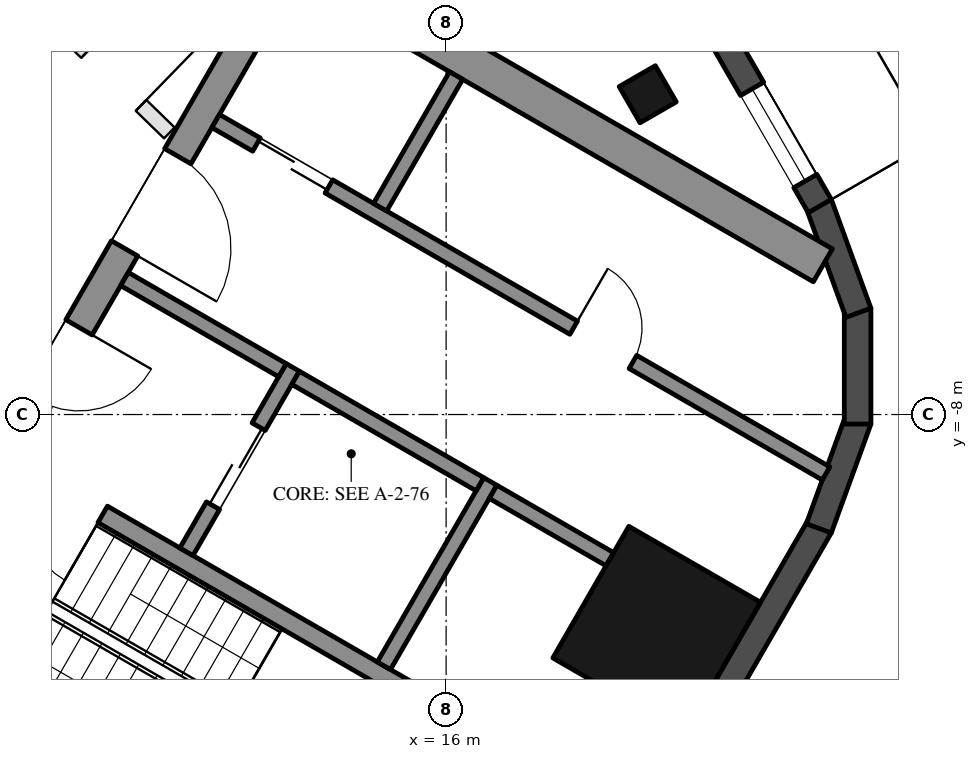
"""IFC4 building model, lengths in metres.
Left out: names, types, materials, properties, quantities, classifications, styles, units other than length and angle.
Written with IfcOpenShell. Run it as: python <this file> out.ifc"""

import sys

from ifc_helpers import new_model, si_unit, direction, frame, frame_2d, origin, origin_2d, place, context, subcontext, project, spatial, rectangle, hollow_rectangle, extrude, boolean, halfspace, element, fill, save


model = new_model("IFC4")
c1 = context("Model", 3, precision=1e-05, world=origin(), true_north=direction((0.0, 1.0)))
c2 = subcontext(c1, "Body", "Model", "MODEL_VIEW")
j1 = project(units=[si_unit("LENGTHUNIT", "METRE"), si_unit("PLANEANGLEUNIT", "RADIAN")], contexts=[c1])
p1 = place(None, origin())
s1 = spatial("IfcSite", under=j1, at=p1, CompositionType="ELEMENT")
p2 = place(p1, origin())
s2 = spatial("IfcBuilding", under=s1, at=p2, CompositionType="ELEMENT")
p3 = place(p2, frame((0.0, 0.0, 324.4)))
s3 = spatial("IfcBuildingStorey", under=s2, at=p3, CompositionType="ELEMENT", Elevation=324.4)
p4 = place(p3, frame((18.652, -3.786, 0.0), z_axis=(0.0, 0.0, 1.0), x_axis=(-0.5, 0.866025403784, 0.0)))
e1 = element("IfcColumn", 1, at=p4, inside=s3, PredefinedType="COLUMN", context=c2, shape_type="SweptSolid", body=[
    boolean("DIFFERENCE", boolean("DIFFERENCE", extrude(hollow_rectangle(XDim=0.55, YDim=0.55, WallThickness=0.025, at=origin_2d()), origin(), (0.0, 0.0, 1.0), 3.7), halfspace(frame((0.0, 0.0, 0.04), z_axis=(0.0, 0.0, 1.0), x_axis=(1.0, 0.0, 0.0)), True)), halfspace(frame((0.0, 0.0, 3.66), z_axis=(0.0, 0.0, 1.0), x_axis=(1.0, 0.0, 0.0)), False)),
])
p5 = place(p3, frame((18.77, -10.837, 0.0), z_axis=(0.0, 0.0, 1.0), x_axis=(0.5, 0.866025403784, 0.0)))
e2 = element("IfcColumn", 2, at=p5, inside=s3, PredefinedType="COLUMN", context=c2, shape_type="SweptSolid", body=[
    boolean("DIFFERENCE", boolean("DIFFERENCE", extrude(hollow_rectangle(XDim=2.0, YDim=2.0, WallThickness=0.05, at=origin_2d()), origin(), (0.0, 0.0, 1.0), 3.7), halfspace(frame((0.0, 0.0, 0.113), z_axis=(0.0, 0.0, 1.0), x_axis=(1.0, 0.0, 0.0)), True)), halfspace(frame((0.0, 0.0, 3.587), z_axis=(0.0, 0.0, 1.0), x_axis=(1.0, 0.0, 0.0)), False)),
])
p6 = place(p3, frame((18.659, -13.379, 0.0), z_axis=(0.0, 0.0, 1.0), x_axis=(0.500042384281, 0.866000931825, 0.0)))
e3 = element("IfcWall", 3, at=p6, inside=s3, PredefinedType="SOLIDWALL", context=c2, shape_type="SweptSolid", body=[
    extrude(rectangle(XDim=4.514, YDim=0.35, at=frame_2d((2.257, 0.0))), origin(), (0.0, 0.0, 1.0), 3.55),
])
for number, where, z_axis, x_axis in (
    (4, (20.903, -9.498, 0.0), (0.0, 0.0, 1.0), (0.342, 0.94, 0.0)),
    (5, (21.414, -8.125, 0.0), (0.0, 0.0, 1.0), (0.0, 1.0, 0.0)),
    (6, (21.425, -6.662, 0.0), (0.0, 0.0, 1.0), (-0.342, 0.94, 0.0)),
):
    element("IfcWall", number, at=place(p3, frame(where, z_axis=z_axis, x_axis=x_axis)), inside=s3, PredefinedType="SOLIDWALL", context=c2, shape_type="SweptSolid", body=[
        extrude(rectangle(XDim=1.524, YDim=0.35, at=frame_2d((0.762, 0.0))), origin(), (0.0, 0.0, 1.0), 3.55),
    ])
p7 = place(p3, frame((20.916, -5.257, 0.0), z_axis=(0.0, 0.0, 1.0), x_axis=(-0.500022310942, 0.866012522173, 0.0)))
e7 = element("IfcWall", 7, at=p7, inside=s3, PredefinedType="SOLIDWALL", context=c2, shape_type="SweptSolid", body=[
    extrude(rectangle(XDim=9.608, YDim=0.35, at=frame_2d((4.804, 0.0))), origin(), (0.0, 0.0, 1.0), 3.55),
])
p8 = place(p7, frame((0.381, 0.0, 0.3)))
e8 = element("IfcOpeningElement", 8, at=p8, cuts=e7, PredefinedType="OPENING", context=c2, shape_type="SweptSolid", body=[
    extrude(rectangle(XDim=1.4, YDim=2.65, at=frame_2d((0.7, 1.325))), frame((0.0, 0.185, 0.0), z_axis=(0.0, -1.0, 0.0), x_axis=(1.0, 0.0, 0.0)), (0.0, 0.0, 1.0), 0.37),
])
p9 = place(p7, frame((5.683, 0.0, 0.0)))
e9 = element("IfcOpeningElement", 9, at=p9, cuts=e7, PredefinedType="OPENING", context=c2, shape_type="SweptSolid", body=[
    extrude(rectangle(XDim=2.4, YDim=2.4, at=frame_2d((1.2, 1.2))), frame((0.0, 0.185, 0.0), z_axis=(0.0, -1.0, 0.0), x_axis=(1.0, 0.0, 0.0)), (0.0, 0.0, 1.0), 0.37),
])
p10 = place(p7, frame((3.031, 0.0, 0.3)))
e10 = element("IfcOpeningElement", 10, at=p10, cuts=e7, PredefinedType="OPENING", context=c2, shape_type="SweptSolid", body=[
    extrude(rectangle(XDim=2.3, YDim=2.65, at=frame_2d((1.15, 1.325))), frame((0.0, 0.185, 0.0), z_axis=(0.0, -1.0, 0.0), x_axis=(1.0, 0.0, 0.0)), (0.0, 0.0, 1.0), 0.37),
])
for number, where, z_axis, x_axis in (
    (11, (8.547, -10.997, 0.0), (0.0, 0.0, 1.0), (0.866, -0.5, 0.0)),
    (12, (13.797, -1.903, 0.0), (0.0, 0.0, 1.0), (0.866, -0.5, 0.0)),
):
    element("IfcWall", number, at=place(p3, frame(where, z_axis=z_axis, x_axis=x_axis)), inside=s3, PredefinedType="SHEAR", context=c2, shape_type="SweptSolid", body=[
        extrude(rectangle(XDim=8.267, YDim=0.5, at=frame_2d((4.134, 0.0))), origin(), (0.0, 0.0, 1.0), 3.5),
    ])
p11 = place(p3, frame((8.845, -10.88, 0.0), z_axis=(0.0, 0.0, 1.0), x_axis=(0.500004234368, 0.866022959057, 0.0)))
e13 = element("IfcWall", 13, at=p11, inside=s3, PredefinedType="SHEAR", context=c2, shape_type="SweptSolid", body=[
    extrude(rectangle(XDim=10.0, YDim=0.4, at=frame_2d((5.0, 0.0))), origin(), (0.0, 0.0, 1.0), 3.5),
])
p12 = place(p11, frame((3.55, 0.0, 0.0)))
e14 = element("IfcOpeningElement", 14, at=p12, cuts=e13, PredefinedType="OPENING", context=c2, shape_type="SweptSolid", body=[
    extrude(rectangle(XDim=1.1, YDim=2.1, at=frame_2d((0.55, 1.05))), frame((0.0, 0.21, 0.0), z_axis=(0.0, -1.0, 0.0), x_axis=(1.0, 0.0, 0.0)), (0.0, 0.0, 1.0), 0.42),
])
p13 = place(p11, frame((5.85, 0.0, 0.0)))
e15 = element("IfcOpeningElement", 15, at=p13, cuts=e13, PredefinedType="OPENING", context=c2, shape_type="SweptSolid", body=[
    extrude(rectangle(XDim=1.4, YDim=2.1, at=frame_2d((0.7, 1.05))), frame((0.0, 0.21, 0.0), z_axis=(0.0, -1.0, 0.0), x_axis=(1.0, 0.0, 0.0)), (0.0, 0.0, 1.0), 0.42),
])
p14 = place(p3, frame((10.356, -8.664, 0.0), z_axis=(0.0, 0.0, 1.0), x_axis=(0.866028629588, -0.499994412703, 0.0)))
e16 = element("IfcWall", 16, at=p14, inside=s3, PredefinedType="SHEAR", context=c2, shape_type="SweptSolid", body=[
    extrude(rectangle(XDim=6.45, YDim=0.25, at=frame_2d((3.225, 0.0))), origin(), (0.0, 0.0, 1.0), 3.5),
])
p15 = place(p14, frame((0.3, 0.0, 0.0)))
e17 = element("IfcOpeningElement", 17, at=p15, cuts=e16, PredefinedType="OPENING", context=c2, shape_type="SweptSolid", body=[
    extrude(rectangle(XDim=1.0, YDim=2.1, at=frame_2d((0.5, 1.05))), frame((0.0, 0.135, 0.0), z_axis=(0.0, -1.0, 0.0), x_axis=(1.0, 0.0, 0.0)), (0.0, 0.0, 1.0), 0.27),
])
p16 = place(p3, frame((15.181, -11.305, 0.0), z_axis=(0.0, 0.0, 1.0), x_axis=(0.49994636267, 0.866056369097, 0.0)))
e18 = element("IfcWall", 18, at=p16, inside=s3, PredefinedType="SHEAR", context=c2, shape_type="SweptSolid", body=[
    extrude(rectangle(XDim=2.8, YDim=0.2, at=frame_2d((1.4, 0.0))), origin(), (0.0, 0.0, 1.0), 3.5),
])
p17 = place(p3, frame((12.583, -9.805, 0.0), z_axis=(0.0, 0.0, 1.0), x_axis=(0.49994636267, 0.866056369097, 0.0)))
e19 = element("IfcWall", 19, at=p17, inside=s3, PredefinedType="SHEAR", context=c2, shape_type="SweptSolid", body=[
    extrude(rectangle(XDim=2.8, YDim=0.2, at=frame_2d((1.4, 0.0))), origin(), (0.0, 0.0, 1.0), 3.5),
])
p18 = place(p17, frame((0.7, 0.0, 0.0)))
e20 = element("IfcOpeningElement", 20, at=p18, cuts=e19, PredefinedType="OPENING", context=c2, shape_type="SweptSolid", body=[
    extrude(rectangle(XDim=1.2, YDim=2.1, at=frame_2d((0.6, 1.05))), frame((0.0, 0.11, 0.0), z_axis=(0.0, -1.0, 0.0), x_axis=(1.0, 0.0, 0.0)), (0.0, 0.0, 1.0), 0.22),
])
p19 = place(p3, frame((11.768, -6.217, 0.0), z_axis=(0.0, 0.0, 1.0), x_axis=(0.866050077142, -0.499957262057, 0.0)))
e21 = element("IfcWall", 21, at=p19, inside=s3, PredefinedType="SHEAR", context=c2, shape_type="SweptSolid", body=[
    extrude(rectangle(XDim=2.4, YDim=0.2, at=frame_2d((1.2, 0.0))), origin(), (0.0, 0.0, 1.0), 3.5),
])
p20 = place(p3, frame((14.02, -7.517, 0.0), z_axis=(0.0, 0.0, 1.0), x_axis=(0.866034573852, -0.49998411664, 0.0)))
e22 = element("IfcWall", 22, at=p20, inside=s3, PredefinedType="SHEAR", context=c2, shape_type="SweptSolid", body=[
    extrude(rectangle(XDim=2.8, YDim=0.2, at=frame_2d((1.4, 0.0))), origin(), (0.0, 0.0, 1.0), 3.5),
])
p21 = place(p3, frame((12.968, -4.138, 0.0), z_axis=(0.0, 0.0, 1.0), x_axis=(0.866022923061, -0.500004296715, 0.0)))
e23 = element("IfcWall", 23, at=p21, inside=s3, PredefinedType="SHEAR", context=c2, shape_type="SweptSolid", body=[
    extrude(rectangle(XDim=9.273, YDim=0.2, at=frame_2d((4.636, 0.0))), origin(), (0.0, 0.0, 1.0), 3.5),
])
p22 = place(p21, frame((0.62, 0.0, 0.0)))
e24 = element("IfcOpeningElement", 24, at=p22, cuts=e23, PredefinedType="OPENING", context=c2, shape_type="SweptSolid", body=[
    extrude(rectangle(XDim=1.1, YDim=2.1, at=frame_2d((0.55, 1.05))), frame((0.0, 0.11, 0.0), z_axis=(0.0, -1.0, 0.0), x_axis=(1.0, 0.0, 0.0)), (0.0, 0.0, 1.0), 0.22),
])
p23 = place(p21, frame((5.439, 0.0, 0.0)))
e25 = element("IfcOpeningElement", 25, at=p23, cuts=e23, PredefinedType="OPENING", context=c2, shape_type="SweptSolid", body=[
    extrude(rectangle(XDim=0.9, YDim=2.1, at=frame_2d((0.45, 1.05))), frame((0.0, 0.11, 0.0), z_axis=(0.0, -1.0, 0.0), x_axis=(1.0, 0.0, 0.0)), (0.0, 0.0, 1.0), 0.22),
])
p24 = place(p3, frame((16.618, -9.017, 0.0), z_axis=(0.0, 0.0, 1.0), x_axis=(0.866066400931, -0.499928984136, 0.0)))
e26 = element("IfcWall", 26, at=p24, inside=s3, PredefinedType="SHEAR", context=c2, shape_type="SweptSolid", body=[
    extrude(rectangle(XDim=1.774, YDim=0.2, at=frame_2d((0.887, 0.0))), origin(), (0.0, 0.0, 1.0), 3.5),
])
p25 = place(p3, frame((15.131, -5.272, 0.0), z_axis=(0.0, 0.0, 1.0), x_axis=(0.499972520799, 0.866041268327, 0.0)))
e27 = element("IfcWall", 27, at=p25, inside=s3, PredefinedType="SHEAR", context=c2, shape_type="SweptSolid", body=[
    extrude(rectangle(XDim=2.0, YDim=0.2, at=frame_2d((1.0, 0.0))), origin(), (0.0, 0.0, 1.0), 3.5),
])
p26 = place(p3, frame((10.896, -2.873, 0.0), z_axis=(0.0, 0.0, 1.0), x_axis=(0.716974970554, -0.697098910916, 0.0)))
e28 = element("IfcWall", 28, at=p26, inside=s3, PredefinedType="PARTITIONING", context=c2, shape_type="SweptSolid", body=[
    extrude(rectangle(XDim=2.039, YDim=0.2, at=frame_2d((1.02, 0.0))), origin(), (0.0, 0.0, 1.0), 3.55),
])
p27 = place(p26, frame((0.52, 0.0, 0.0)))
e29 = element("IfcOpeningElement", 29, at=p27, cuts=e28, PredefinedType="OPENING", context=c2, shape_type="SweptSolid", body=[
    extrude(rectangle(XDim=1.0, YDim=2.1, at=frame_2d((0.5, 1.05))), frame((0.0, 0.11, 0.0), z_axis=(0.0, -1.0, 0.0), x_axis=(1.0, 0.0, 0.0)), (0.0, 0.0, 1.0), 0.22),
])
p28 = place(p8, origin())
e30 = element("IfcWindow", 30, at=p28, inside=s3, PartitioningType="SINGLE_PANEL", PredefinedType="WINDOW", context=c2, shape_type="SweptSolid", body=[
    extrude(rectangle(XDim=1.4, YDim=2.65, at=frame_2d((0.7, 1.325))), frame((0.0, 0.03, 0.0), z_axis=(0.0, -1.0, 0.0), x_axis=(1.0, 0.0, 0.0)), (0.0, 0.0, 1.0), 0.06),
])
fill(e8, e30)
p29 = place(p18, origin())
e31 = element("IfcDoor", 31, at=p29, inside=s3, OperationType="DOUBLE_DOOR_SLIDING", PredefinedType="DOOR", context=c2, shape_type="SweptSolid", body=[
    extrude(rectangle(XDim=1.2, YDim=2.1, at=frame_2d((0.6, 1.05))), frame((0.0, 0.025, 0.0), z_axis=(0.0, -1.0, 0.0), x_axis=(1.0, 0.0, 0.0)), (0.0, 0.0, 1.0), 0.05),
])
fill(e20, e31)
p30 = place(p22, origin())
e32 = element("IfcDoor", 32, at=p30, inside=s3, OperationType="DOUBLE_DOOR_SLIDING", PredefinedType="DOOR", context=c2, shape_type="SweptSolid", body=[
    extrude(rectangle(XDim=1.1, YDim=2.1, at=frame_2d((0.55, 1.05))), frame((0.0, 0.025, 0.0), z_axis=(0.0, -1.0, 0.0), x_axis=(1.0, 0.0, 0.0)), (0.0, 0.0, 1.0), 0.05),
])
fill(e24, e32)
p31 = place(p23, origin())
e33 = element("IfcDoor", 33, at=p31, inside=s3, OperationType="SINGLE_SWING_LEFT", PredefinedType="DOOR", context=c2, shape_type="SweptSolid", body=[
    extrude(rectangle(XDim=0.9, YDim=2.1, at=frame_2d((0.45, 1.05))), frame((0.0, 0.025, 0.0), z_axis=(0.0, -1.0, 0.0), x_axis=(1.0, 0.0, 0.0)), (0.0, 0.0, 1.0), 0.05),
])
fill(e25, e33)
p32 = place(p12, frame((1.1, 0.0, 0.0), z_axis=(0.0, 0.0, 1.0), x_axis=(-1.0, 0.0, 0.0)))
e34 = element("IfcDoor", 34, at=p32, inside=s3, OperationType="SINGLE_SWING_LEFT", PredefinedType="DOOR", context=c2, shape_type="SweptSolid", body=[
    extrude(rectangle(XDim=1.1, YDim=2.1, at=frame_2d((0.55, 1.05))), frame((0.0, 0.025, 0.0), z_axis=(0.0, -1.0, 0.0), x_axis=(1.0, 0.0, 0.0)), (0.0, 0.0, 1.0), 0.05),
])
fill(e14, e34)
p33 = place(p13, frame((1.4, 0.0, 0.0), z_axis=(0.0, 0.0, 1.0), x_axis=(-1.0, 0.0, 0.0)))
e35 = element("IfcDoor", 35, at=p33, inside=s3, OperationType="DOUBLE_DOOR_SINGLE_SWING", PredefinedType="DOOR", context=c2, shape_type="SweptSolid", body=[
    extrude(rectangle(XDim=1.4, YDim=2.1, at=frame_2d((0.7, 1.05))), frame((0.0, 0.025, 0.0), z_axis=(0.0, -1.0, 0.0), x_axis=(1.0, 0.0, 0.0)), (0.0, 0.0, 1.0), 0.05),
])
fill(e15, e35)
p34 = place(p15, frame((1.0, 0.0, 0.0), z_axis=(0.0, 0.0, 1.0), x_axis=(-1.0, 0.0, 0.0)))
e36 = element("IfcDoor", 36, at=p34, inside=s3, OperationType="SINGLE_SWING_LEFT", PredefinedType="DOOR", context=c2, shape_type="SweptSolid", body=[
    extrude(rectangle(XDim=1.0, YDim=2.1, at=frame_2d((0.5, 1.05))), frame((0.0, 0.025, 0.0), z_axis=(0.0, -1.0, 0.0), x_axis=(1.0, 0.0, 0.0)), (0.0, 0.0, 1.0), 0.05),
])
fill(e17, e36)
p35 = place(p27, origin())
e37 = element("IfcDoor", 37, at=p35, inside=s3, OperationType="SINGLE_SWING_RIGHT", PredefinedType="DOOR", context=c2, shape_type="SweptSolid", body=[
    extrude(rectangle(XDim=1.0, YDim=2.1, at=frame_2d((0.5, 1.05))), frame((0.0, 0.025, 0.0), z_axis=(0.0, -1.0, 0.0), x_axis=(1.0, 0.0, 0.0)), (0.0, 0.0, 1.0), 0.05),
])
fill(e29, e37)
save(model, sys.argv[1])
